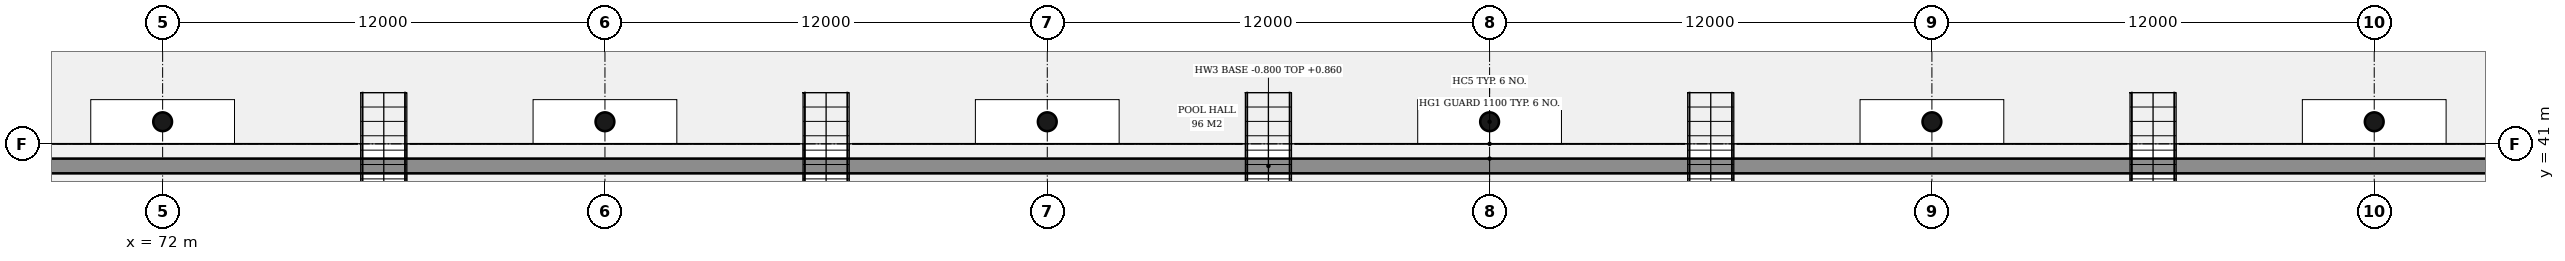
"""IFC4 building model, lengths in metres.
Left out: names, types, materials, properties, quantities, classifications, styles, units other than length and angle.
Written with IfcOpenShell. Run it as: python <this file> out.ifc"""

import sys

from ifc_helpers import new_model, si_unit, direction, frame, frame_2d, origin, origin_2d, place, context, subcontext, project, spatial, rectangle, hollow_circle, extrude, element, save


model = new_model("IFC4")
c1 = context("Model", 3, precision=1e-05, world=origin(), true_north=direction((0.0, 1.0)))
c2 = subcontext(c1, "Body", "Model", "MODEL_VIEW")
j1 = project(units=[si_unit("LENGTHUNIT", "METRE"), si_unit("PLANEANGLEUNIT", "RADIAN")], contexts=[c1])
p1 = place(None, origin())
s1 = spatial("IfcSite", under=j1, at=p1, CompositionType="ELEMENT")
p2 = place(p1, origin())
s2 = spatial("IfcBuilding", under=s1, at=p2, CompositionType="ELEMENT")
p3 = place(p2, origin())
s3 = spatial("IfcBuildingStorey", under=s2, at=p3, CompositionType="ELEMENT", Elevation=0.0)
p4 = place(p3, frame((64.0, 40.4, -0.8), z_axis=(0.0, 0.0, 1.0), x_axis=(1.0, 0.0, 0.0)))
e1 = element("IfcWall", 1, at=p4, inside=s3, PredefinedType="SOLIDWALL", context=c2, shape_type="SweptSolid", body=[
    extrude(rectangle(XDim=76.0, YDim=0.4, at=frame_2d((38.0, 0.0))), origin(), (0.0, 0.0, 1.0), 1.66),
])
for number, where, z_axis, x_axis in (
    (2, (72.0, 41.6, 0.0), (0.0, 0.0, 1.0), (1.0, 0.0, 0.0)),
    (3, (84.0, 41.6, 0.0), (0.0, 0.0, 1.0), (1.0, 0.0, 0.0)),
    (4, (96.0, 41.6, 0.0), (0.0, 0.0, 1.0), (1.0, 0.0, 0.0)),
    (5, (108.0, 41.6, 0.0), (0.0, 0.0, 1.0), (1.0, 0.0, 0.0)),
    (6, (120.0, 41.6, 0.0), (0.0, 0.0, 1.0), (1.0, 0.0, 0.0)),
    (7, (132.0, 41.6, 0.0), (0.0, 0.0, 1.0), (1.0, 0.0, 0.0)),
):
    element("IfcColumn", number, at=place(p3, frame(where, z_axis=z_axis, x_axis=x_axis)), inside=s3, PredefinedType="COLUMN", context=c2, shape_type="SweptSolid", body=[
        extrude(hollow_circle(Radius=0.254, WallThickness=0.016, at=origin_2d()), origin(), (0.0, 0.0, 1.0), 5.0),
    ])
save(model, sys.argv[1])
